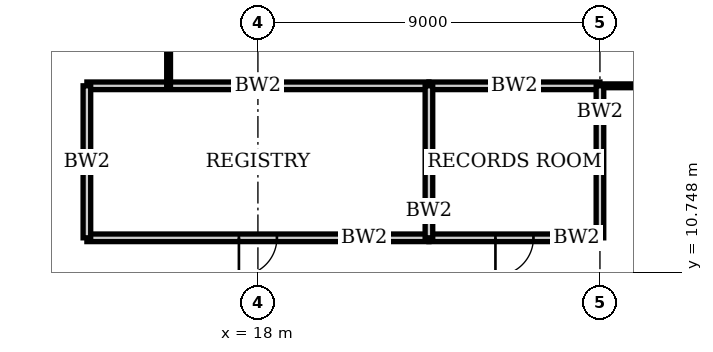
"""IFC4 building model, lengths in metres.
Left out: names, types, materials, properties, quantities, classifications, styles, units other than length and angle.
Written with IfcOpenShell. Run it as: python <this file> out.ifc"""

import sys

from ifc_helpers import new_model, si_unit, direction, frame, frame_2d, origin, place, context, subcontext, project, spatial, rectangle, extrude, element, fill, save


model = new_model("IFC4")
c1 = context("Model", 3, precision=1e-05, world=origin(), true_north=direction((0.0, 1.0)))
c2 = subcontext(c1, "Body", "Model", "MODEL_VIEW")
j1 = project(units=[si_unit("LENGTHUNIT", "METRE"), si_unit("PLANEANGLEUNIT", "RADIAN")], contexts=[c1])
p1 = place(None, origin())
s1 = spatial("IfcSite", under=j1, at=p1, CompositionType="ELEMENT")
p2 = place(p1, origin())
s2 = spatial("IfcBuilding", under=s1, at=p2, CompositionType="ELEMENT")
p3 = place(p2, frame((0.0, 0.0, 31.8)))
s3 = spatial("IfcBuildingStorey", under=s2, at=p3, CompositionType="ELEMENT", Elevation=31.8)
p4 = place(p3, frame((13.5, 11.65, 0.0), z_axis=(0.0, 0.0, 1.0), x_axis=(1.0, 0.0, 0.0)))
e1 = element("IfcWall", 1, at=p4, inside=s3, PredefinedType="SOLIDWALL", context=c2, shape_type="SweptSolid", body=[
    extrude(rectangle(XDim=9.0, YDim=0.2, at=frame_2d((4.5, 0.0))), origin(), (0.0, 0.0, 1.0), 3.75),
])
p5 = place(p4, frame((4.0, 0.0, 0.0)))
e2 = element("IfcOpeningElement", 2, at=p5, cuts=e1, PredefinedType="OPENING", context=c2, shape_type="SweptSolid", body=[
    extrude(rectangle(XDim=1.0, YDim=2.4, at=frame_2d((0.5, 1.2))), frame((0.0, 0.11, 0.0), z_axis=(0.0, -1.0, 0.0), x_axis=(1.0, 0.0, 0.0)), (0.0, 0.0, 1.0), 0.22),
])
p6 = place(p3, frame((22.5, 11.65, 0.0), z_axis=(0.0, 0.0, 1.0), x_axis=(1.0, 0.0, 0.0)))
e3 = element("IfcWall", 3, at=p6, inside=s3, PredefinedType="SOLIDWALL", context=c2, shape_type="SweptSolid", body=[
    extrude(rectangle(XDim=4.5, YDim=0.2, at=frame_2d((2.25, 0.0))), origin(), (0.0, 0.0, 1.0), 3.75),
])
p7 = place(p6, frame((1.75, 0.0, 0.0)))
e4 = element("IfcOpeningElement", 4, at=p7, cuts=e3, PredefinedType="OPENING", context=c2, shape_type="SweptSolid", body=[
    extrude(rectangle(XDim=1.0, YDim=2.4, at=frame_2d((0.5, 1.2))), frame((0.0, 0.11, 0.0), z_axis=(0.0, -1.0, 0.0), x_axis=(1.0, 0.0, 0.0)), (0.0, 0.0, 1.0), 0.22),
])
p8 = place(p3, frame((13.5, 15.65, 0.0), z_axis=(0.0, 0.0, 1.0), x_axis=(1.0, 0.0, 0.0)))
e5 = element("IfcWall", 5, at=p8, inside=s3, PredefinedType="SOLIDWALL", context=c2, shape_type="SweptSolid", body=[
    extrude(rectangle(XDim=9.0, YDim=0.2, at=frame_2d((4.5, 0.0))), origin(), (0.0, 0.0, 1.0), 3.75),
])
p9 = place(p3, frame((22.5, 15.65, 0.0), z_axis=(0.0, 0.0, 1.0), x_axis=(1.0, 0.0, 0.0)))
e6 = element("IfcWall", 6, at=p9, inside=s3, PredefinedType="SOLIDWALL", context=c2, shape_type="SweptSolid", body=[
    extrude(rectangle(XDim=4.5, YDim=0.2, at=frame_2d((2.25, 0.0))), origin(), (0.0, 0.0, 1.0), 3.75),
])
p10 = place(p3, frame((27.0, 15.65, 0.0), z_axis=(0.0, 0.0, 1.0), x_axis=(1.0, 0.0, 0.0)))
e7 = element("IfcWall", 7, at=p10, inside=s3, PredefinedType="PARTITIONING", context=c2, shape_type="SweptSolid", body=[
    extrude(rectangle(XDim=20.35, YDim=0.1, at=frame_2d((10.175, 0.0))), origin(), (0.0, 0.0, 1.0), 3.75),
])
p11 = place(p10, frame((9.675, 0.0, 0.0)))
e8 = element("IfcOpeningElement", 8, at=p11, cuts=e7, PredefinedType="OPENING", context=c2, shape_type="SweptSolid", body=[
    extrude(rectangle(XDim=1.0, YDim=2.4, at=frame_2d((0.5, 1.2))), frame((0.0, 0.06, 0.0), z_axis=(0.0, -1.0, 0.0), x_axis=(1.0, 0.0, 0.0)), (0.0, 0.0, 1.0), 0.12),
])
p12 = place(p3, frame((13.5, 11.65, 0.0), z_axis=(0.0, 0.0, 1.0), x_axis=(0.0, 1.0, 0.0)))
e9 = element("IfcWall", 9, at=p12, inside=s3, PredefinedType="SOLIDWALL", context=c2, shape_type="SweptSolid", body=[
    extrude(rectangle(XDim=4.0, YDim=0.2, at=frame_2d((2.0, 0.0))), origin(), (0.0, 0.0, 1.0), 3.75),
])
p13 = place(p3, frame((15.65, 15.65, 0.0), z_axis=(0.0, 0.0, 1.0), x_axis=(0.0, 1.0, 0.0)))
e10 = element("IfcWall", 10, at=p13, inside=s3, PredefinedType="PARTITIONING", context=c2, shape_type="SweptSolid", body=[
    extrude(rectangle(XDim=22.7, YDim=0.1, at=frame_2d((11.35, 0.0))), origin(), (0.0, 0.0, 1.0), 3.75),
])
p14 = place(p13, frame((10.85, 0.0, 0.0)))
e11 = element("IfcOpeningElement", 11, at=p14, cuts=e10, PredefinedType="OPENING", context=c2, shape_type="SweptSolid", body=[
    extrude(rectangle(XDim=1.0, YDim=2.4, at=frame_2d((0.5, 1.2))), frame((0.0, 0.06, 0.0), z_axis=(0.0, -1.0, 0.0), x_axis=(1.0, 0.0, 0.0)), (0.0, 0.0, 1.0), 0.12),
])
p15 = place(p3, frame((22.5, 11.65, 0.0), z_axis=(0.0, 0.0, 1.0), x_axis=(0.0, 1.0, 0.0)))
e12 = element("IfcWall", 12, at=p15, inside=s3, PredefinedType="SOLIDWALL", context=c2, shape_type="SweptSolid", body=[
    extrude(rectangle(XDim=4.0, YDim=0.2, at=frame_2d((2.0, 0.0))), origin(), (0.0, 0.0, 1.0), 3.75),
])
p16 = place(p3, frame((27.0, 11.65, 0.0), z_axis=(0.0, 0.0, 1.0), x_axis=(0.0, 1.0, 0.0)))
e13 = element("IfcWall", 13, at=p16, inside=s3, PredefinedType="SOLIDWALL", context=c2, shape_type="SweptSolid", body=[
    extrude(rectangle(XDim=4.0, YDim=0.2, at=frame_2d((2.0, 0.0))), origin(), (0.0, 0.0, 1.0), 3.05),
])
p17 = place(p5, origin())
e14 = element("IfcDoor", 14, at=p17, inside=s3, OperationType="SINGLE_SWING_LEFT", PredefinedType="DOOR", context=c2, shape_type="SweptSolid", body=[
    extrude(rectangle(XDim=1.0, YDim=2.4, at=frame_2d((0.5, 1.2))), frame((0.0, 0.035, 0.0), z_axis=(0.0, -1.0, 0.0), x_axis=(1.0, 0.0, 0.0)), (0.0, 0.0, 1.0), 0.07),
])
fill(e2, e14)
p18 = place(p7, origin())
e15 = element("IfcDoor", 15, at=p18, inside=s3, OperationType="SINGLE_SWING_LEFT", PredefinedType="DOOR", context=c2, shape_type="SweptSolid", body=[
    extrude(rectangle(XDim=1.0, YDim=2.4, at=frame_2d((0.5, 1.2))), frame((0.0, 0.035, 0.0), z_axis=(0.0, -1.0, 0.0), x_axis=(1.0, 0.0, 0.0)), (0.0, 0.0, 1.0), 0.07),
])
fill(e4, e15)
save(model, sys.argv[1])
